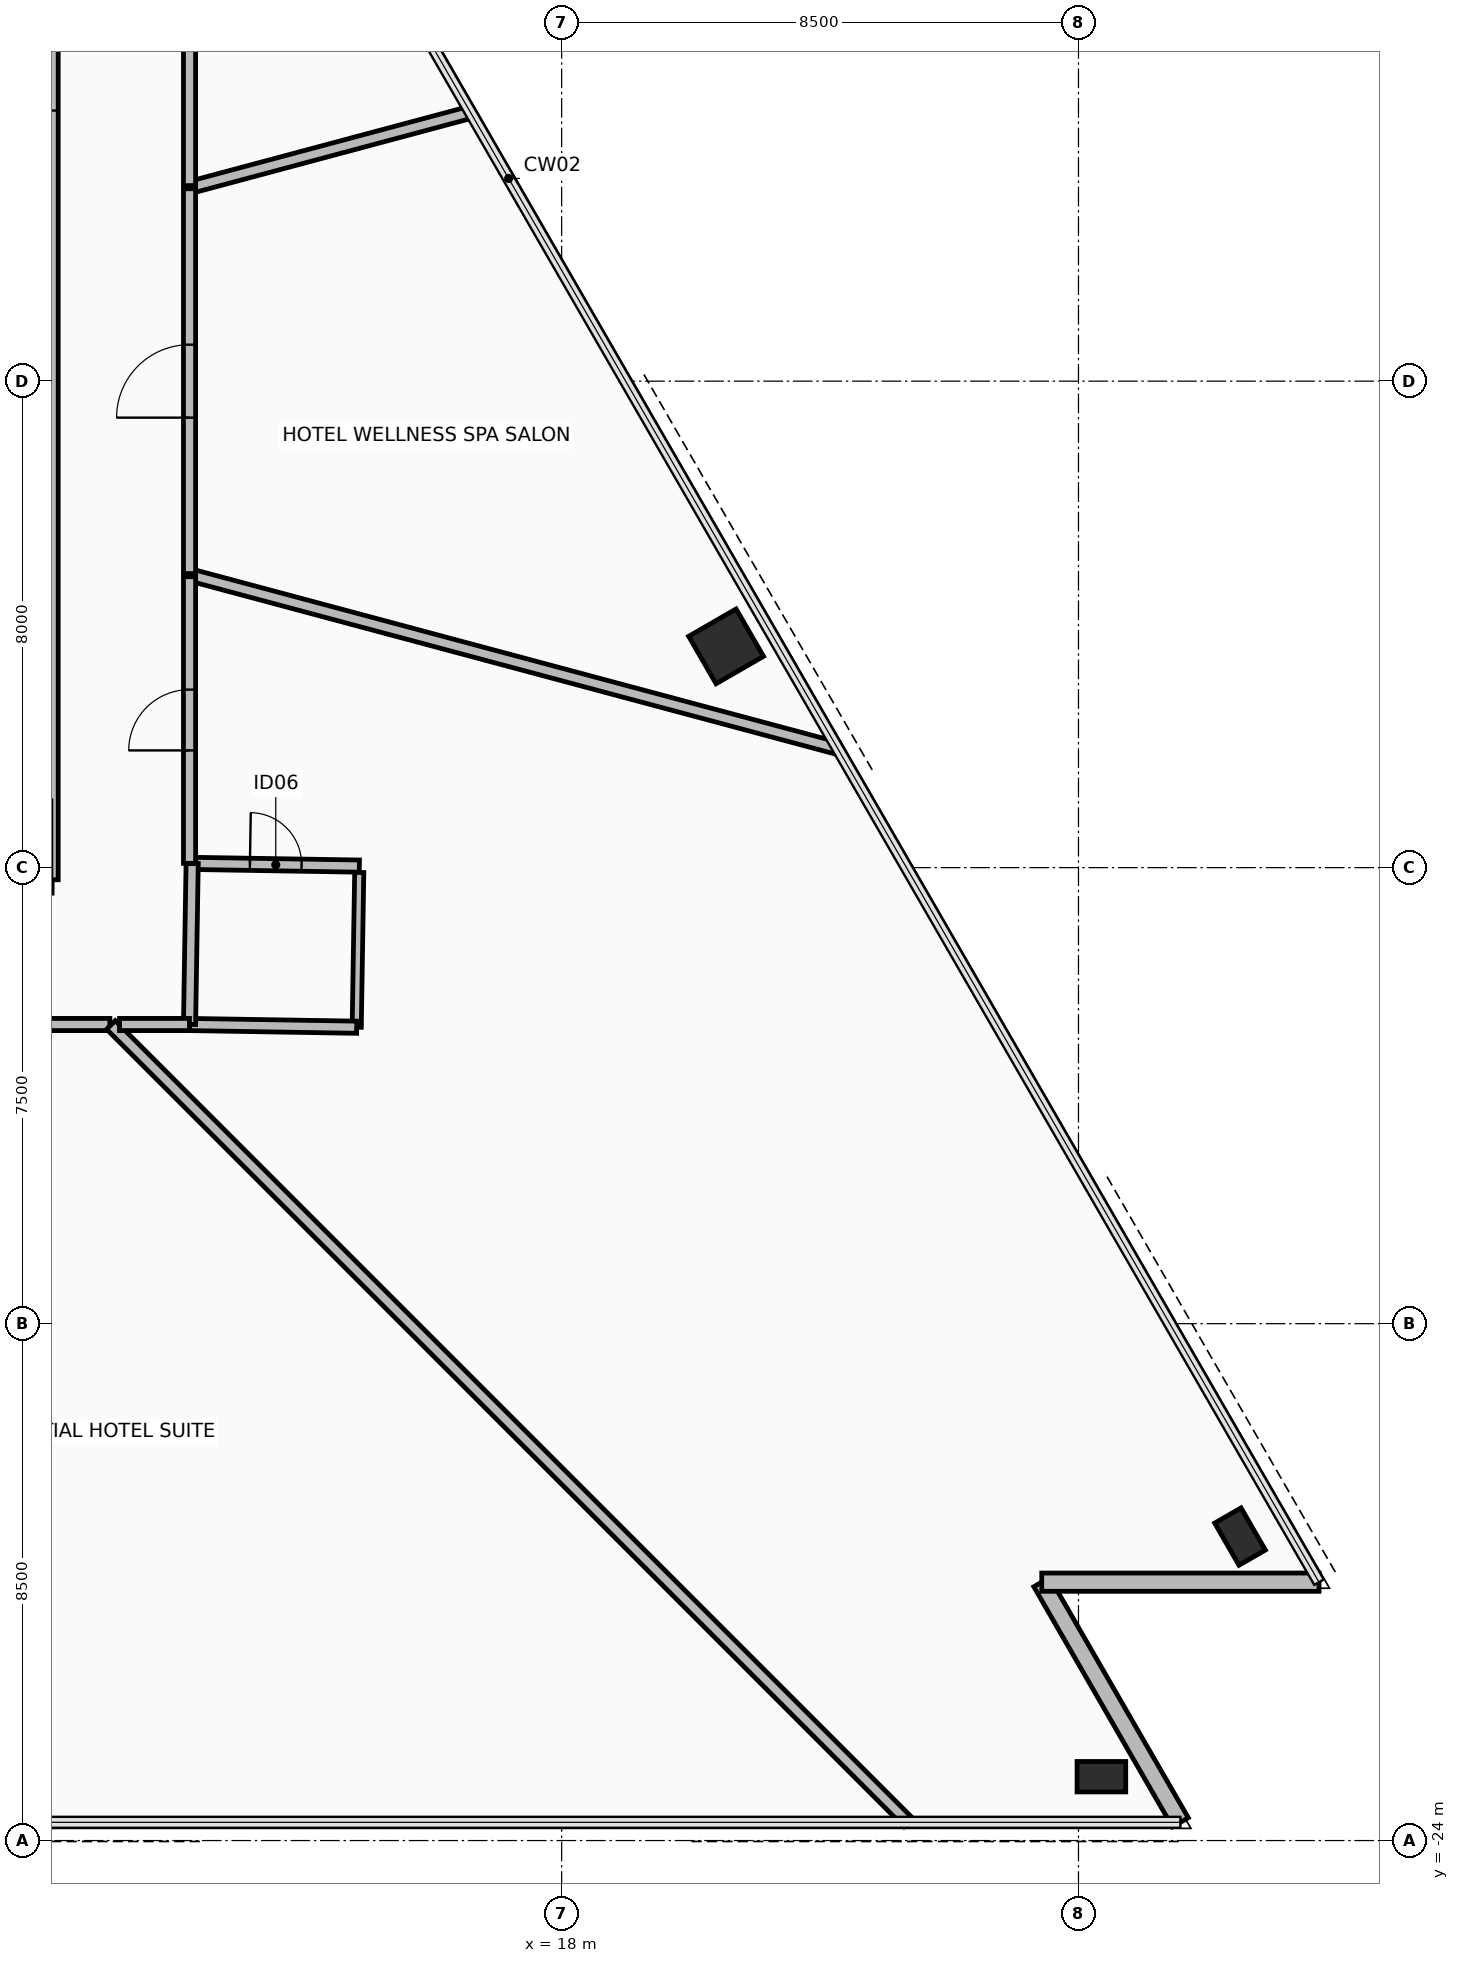
"""IFC4 building model, lengths in metres.
Left out: names, types, materials, properties, quantities, classifications, styles, units other than length and angle.
Written with IfcOpenShell. Run it as: python <this file> out.ifc"""

import sys

from ifc_helpers import new_model, si_unit, direction, frame, frame_2d, origin, origin_2d, place, context, subcontext, project, spatial, rectangle, hollow_rectangle, extrude, element, fill, save


model = new_model("IFC4")
c1 = context("Model", 3, precision=1e-05, world=origin(), true_north=direction((0.0, 1.0)))
c2 = subcontext(c1, "Body", "Model", "MODEL_VIEW")
j1 = project(units=[si_unit("LENGTHUNIT", "METRE"), si_unit("PLANEANGLEUNIT", "RADIAN")], contexts=[c1])
p1 = place(None, origin())
s1 = spatial("IfcSite", under=j1, at=p1, CompositionType="ELEMENT")
p2 = place(p1, origin())
s2 = spatial("IfcBuilding", under=s1, at=p2, CompositionType="ELEMENT")
p3 = place(p2, frame((0.0, 0.0, 48.85)))
s3 = spatial("IfcBuildingStorey", under=s2, at=p3, CompositionType="ELEMENT", Elevation=48.85)
for number, where, z_axis, x_axis in (
    (1, (26.877, -22.95, 0.0), (0.0, 0.0, 1.0), (1.0, 0.0, 0.0)),
    (2, (29.157, -19.001, 0.0), (0.0, 0.0, 1.0), (-0.5, 0.866, 0.0)),
):
    element("IfcColumn", number, at=place(p3, frame(where, z_axis=z_axis, x_axis=x_axis)), inside=s3, PredefinedType="COLUMN", context=c2, shape_type="SweptSolid", body=[
        extrude(hollow_rectangle(XDim=0.5, YDim=0.8, WallThickness=0.04, at=origin_2d()), origin(), (0.0, 0.0, 1.0), 3.4),
    ])
p4 = place(p3, frame((20.705, -4.361, 0.0), z_axis=(0.0, 0.0, 1.0), x_axis=(-0.500001511499, 0.866024531118, 0.0)))
e3 = element("IfcColumn", 3, at=p4, inside=s3, PredefinedType="COLUMN", context=c2, shape_type="SweptSolid", body=[
    extrude(hollow_rectangle(XDim=0.9, YDim=0.9, WallThickness=0.05, at=origin_2d()), origin(), (0.0, 0.0, 1.0), 3.4),
])
p5 = place(p3, frame((28.176, -23.7, 0.0), z_axis=(0.0, 0.0, 1.0), x_axis=(-0.500014431597, 0.866017071537, 0.0)))
e4 = element("IfcWall", 4, at=p5, inside=s3, PredefinedType="STANDARD", context=c2, shape_type="SweptSolid", body=[
    extrude(rectangle(XDim=4.56, YDim=0.3, at=frame_2d((2.28, 0.0))), origin(), (0.0, 0.0, 1.0), 2.42),
])
p6 = place(p3, frame((25.896, -19.751, 0.0), z_axis=(0.0, 0.0, 1.0), x_axis=(1.0, 0.0, 0.0)))
e5 = element("IfcWall", 5, at=p6, inside=s3, PredefinedType="STANDARD", context=c2, shape_type="SweptSolid", body=[
    extrude(rectangle(XDim=4.56, YDim=0.3, at=frame_2d((2.28, 0.0))), origin(), (0.0, 0.0, 1.0), 2.42),
])
p7 = place(p3, frame((-9.62, -8.32, 0.0), z_axis=(0.0, 0.0, 1.0), x_axis=(1.0, 0.0, 0.0)))
e6 = element("IfcWall", 6, at=p7, inside=s3, PredefinedType="PARTITIONING", context=c2, shape_type="SweptSolid", body=[
    extrude(rectangle(XDim=19.24, YDim=0.2, at=frame_2d((9.62, 0.0))), origin(), (0.0, 0.0, 1.0), 2.62),
])
p8 = place(p7, frame((15.02, 0.0, 0.0)))
e7 = element("IfcOpeningElement", 7, at=p8, cuts=e6, PredefinedType="OPENING", context=c2, shape_type="SweptSolid", body=[
    extrude(rectangle(XDim=0.9, YDim=2.1, at=frame_2d((0.45, 1.05))), frame((0.0, 0.11, 0.0), z_axis=(0.0, -1.0, 0.0), x_axis=(1.0, 0.0, 0.0)), (0.0, 0.0, 1.0), 0.22),
])
p9 = place(p3, frame((9.62, -8.2, 0.0), z_axis=(0.0, 0.0, 1.0), x_axis=(0.0, 1.0, 0.0)))
e8 = element("IfcWall", 8, at=p9, inside=s3, PredefinedType="PARTITIONING", context=c2, shape_type="SweptSolid", body=[
    extrude(rectangle(XDim=16.4, YDim=0.2, at=frame_2d((8.2, 0.0))), origin(), (0.0, 0.0, 1.0), 2.62),
])
p10 = place(p9, frame((12.65, 0.0, 0.0)))
e9 = element("IfcOpeningElement", 9, at=p10, cuts=e8, PredefinedType="OPENING", context=c2, shape_type="SweptSolid", body=[
    extrude(rectangle(XDim=1.1, YDim=2.15, at=frame_2d((0.55, 1.075))), frame((0.0, 0.11, 0.0), z_axis=(0.0, -1.0, 0.0), x_axis=(1.0, 0.0, 0.0)), (0.0, 0.0, 1.0), 0.22),
])
p11 = place(p3, frame((11.923, -7.93, 0.0), z_axis=(0.0, 0.0, 1.0), x_axis=(0.999868029143, -0.016245747077, 0.0)))
e10 = element("IfcWall", 10, at=p11, inside=s3, PredefinedType="PARTITIONING", context=c2, shape_type="SweptSolid", body=[
    extrude(rectangle(XDim=2.75, YDim=0.2, at=frame_2d((1.375, 0.0))), origin(), (0.0, 0.0, 1.0), 3.225),
])
p12 = place(p11, frame((0.95, 0.0, 0.0)))
e11 = element("IfcOpeningElement", 11, at=p12, cuts=e10, PredefinedType="OPENING", context=c2, shape_type="SweptSolid", body=[
    extrude(rectangle(XDim=0.85, YDim=2.1, at=frame_2d((0.425, 1.05))), frame((0.0, 0.11, 0.0), z_axis=(0.0, -1.0, 0.0), x_axis=(1.0, 0.0, 0.0)), (0.0, 0.0, 1.0), 0.22),
])
p13 = place(p3, frame((14.671, -8.08, 0.0), z_axis=(0.0, 0.0, 1.0), x_axis=(-0.016307914507, -0.99986701712, 0.0)))
e12 = element("IfcWall", 12, at=p13, inside=s3, PredefinedType="PARTITIONING", context=c2, shape_type="SweptSolid", body=[
    extrude(rectangle(XDim=2.545, YDim=0.15, at=frame_2d((1.272, 0.0))), origin(), (0.0, 0.0, 1.0), 2.62),
])
p14 = place(p3, frame((14.63, -10.625, 0.0), z_axis=(0.0, 0.0, 1.0), x_axis=(-0.999868029143, 0.016245747077, 0.0)))
e13 = element("IfcWall", 13, at=p14, inside=s3, PredefinedType="PARTITIONING", context=c2, shape_type="SweptSolid", body=[
    extrude(rectangle(XDim=2.75, YDim=0.2, at=frame_2d((1.375, 0.0))), origin(), (0.0, 0.0, 1.0), 2.62),
])
p15 = place(p3, frame((11.88, -10.578, 0.0), z_axis=(0.0, 0.0, 1.0), x_axis=(0.016318711927, 0.999866840955, 0.0)))
e14 = element("IfcWall", 14, at=p15, inside=s3, PredefinedType="PARTITIONING", context=c2, shape_type="SweptSolid", body=[
    extrude(rectangle(XDim=2.648, YDim=0.2, at=frame_2d((1.324, 0.0))), origin(), (0.0, 0.0, 1.0), 2.62),
])
p16 = place(p3, frame((16.5, 4.421, 0.0), z_axis=(0.0, 0.0, 1.0), x_axis=(-0.965923733473, -0.258826855473, 0.0)))
e15 = element("IfcWall", 15, at=p16, inside=s3, PredefinedType="PARTITIONING", context=c2, shape_type="SweptSolid", body=[
    extrude(rectangle(XDim=4.75, YDim=0.2, at=frame_2d((2.375, 0.0))), origin(), (0.0, 0.0, 1.0), 2.42),
])
p17 = place(p3, frame((11.88, 3.216, 0.0), z_axis=(0.0, 0.0, 1.0), x_axis=(0.0, 1.0, 0.0)))
e16 = element("IfcWall", 16, at=p17, inside=s3, PredefinedType="PARTITIONING", context=c2, shape_type="SweptSolid", body=[
    extrude(rectangle(XDim=7.259, YDim=0.2, at=frame_2d((3.63, 0.0))), origin(), (0.0, 0.0, 1.0), 2.42),
])
p18 = place(p17, frame((3.03, 0.0, 0.0)))
e17 = element("IfcOpeningElement", 17, at=p18, cuts=e16, PredefinedType="OPENING", context=c2, shape_type="SweptSolid", body=[
    extrude(rectangle(XDim=1.2, YDim=2.15, at=frame_2d((0.6, 1.075))), frame((0.0, 0.11, 0.0), z_axis=(0.0, -1.0, 0.0), x_axis=(1.0, 0.0, 0.0)), (0.0, 0.0, 1.0), 0.22),
])
p19 = place(p3, frame((2.867, -10.58, 0.0), z_axis=(0.0, 0.0, 1.0), x_axis=(1.0, 0.0, 0.0)))
e18 = element("IfcWall", 18, at=p19, inside=s3, PredefinedType="PARTITIONING", context=c2, shape_type="SweptSolid", body=[
    extrude(rectangle(XDim=7.702, YDim=0.2, at=frame_2d((3.851, 0.0))), origin(), (0.0, 0.0, 1.0), 2.62),
])
p20 = place(p19, frame((3.351, 0.0, 0.0)))
e19 = element("IfcOpeningElement", 19, at=p20, cuts=e18, PredefinedType="OPENING", context=c2, shape_type="SweptSolid", body=[
    extrude(rectangle(XDim=1.0, YDim=2.15, at=frame_2d((0.5, 1.075))), frame((0.0, 0.11, 0.0), z_axis=(0.0, -1.0, 0.0), x_axis=(1.0, 0.0, 0.0)), (0.0, 0.0, 1.0), 0.22),
])
p21 = place(p3, frame((10.587, -10.587, 0.0), z_axis=(0.0, 0.0, 1.0), x_axis=(0.707106781187, -0.707106781187, 0.0)))
e20 = element("IfcWall", 20, at=p21, inside=s3, PredefinedType="PARTITIONING", context=c2, shape_type="SweptSolid", body=[
    extrude(rectangle(XDim=18.544, YDim=0.2, at=frame_2d((9.272, 0.0))), origin(), (0.0, 0.0, 1.0), 2.42),
])
p22 = place(p3, frame((11.912, -3.192, 0.0), z_axis=(0.0, 0.0, 1.0), x_axis=(0.965922374415, -0.258831927328, 0.0)))
e21 = element("IfcWall", 21, at=p22, inside=s3, PredefinedType="PARTITIONING", context=c2, shape_type="SweptSolid", body=[
    extrude(rectangle(XDim=10.992, YDim=0.2, at=frame_2d((5.496, 0.0))), origin(), (0.0, 0.0, 1.0), 2.42),
])
p23 = place(p3, frame((10.729, -10.58, 0.0), z_axis=(0.0, 0.0, 1.0), x_axis=(1.0, 0.0, 0.0)))
e22 = element("IfcWall", 22, at=p23, inside=s3, PredefinedType="PARTITIONING", context=c2, shape_type="SweptSolid", body=[
    extrude(rectangle(XDim=1.151, YDim=0.2, at=frame_2d((0.575, 0.0))), origin(), (0.0, 0.0, 1.0), 3.225),
])
p24 = place(p3, frame((11.88, -7.93, 0.0), z_axis=(0.0, 0.0, 1.0), x_axis=(0.0, 1.0, 0.0)))
e23 = element("IfcWall", 23, at=p24, inside=s3, PredefinedType="PARTITIONING", context=c2, shape_type="SweptSolid", body=[
    extrude(rectangle(XDim=4.714, YDim=0.2, at=frame_2d((2.357, 0.0))), origin(), (0.0, 0.0, 1.0), 2.62),
])
p25 = place(p24, frame((1.857, 0.0, 0.0)))
e24 = element("IfcOpeningElement", 24, at=p25, cuts=e23, PredefinedType="OPENING", context=c2, shape_type="SweptSolid", body=[
    extrude(rectangle(XDim=1.0, YDim=2.15, at=frame_2d((0.5, 1.075))), frame((0.0, 0.11, 0.0), z_axis=(0.0, -1.0, 0.0), x_axis=(1.0, 0.0, 0.0)), (0.0, 0.0, 1.0), 0.22),
])
p26 = place(p3, frame((11.88, -3.164, 0.0), z_axis=(0.0, 0.0, 1.0), x_axis=(0.0, 1.0, 0.0)))
e25 = element("IfcWall", 25, at=p26, inside=s3, PredefinedType="PARTITIONING", context=c2, shape_type="SweptSolid", body=[
    extrude(rectangle(XDim=6.328, YDim=0.2, at=frame_2d((3.164, 0.0))), origin(), (0.0, 0.0, 1.0), 3.225),
])
p27 = place(p26, frame((2.564, 0.0, 0.0)))
e26 = element("IfcOpeningElement", 26, at=p27, cuts=e25, PredefinedType="OPENING", context=c2, shape_type="SweptSolid", body=[
    extrude(rectangle(XDim=1.2, YDim=2.15, at=frame_2d((0.6, 1.075))), frame((0.0, 0.11, 0.0), z_axis=(0.0, -1.0, 0.0), x_axis=(1.0, 0.0, 0.0)), (0.0, 0.0, 1.0), 0.22),
])
p28 = place(p10, frame((1.1, 0.0, 0.0), z_axis=(0.0, 0.0, 1.0), x_axis=(-1.0, 0.0, 0.0)))
e27 = element("IfcDoor", 27, at=p28, inside=s3, OperationType="SINGLE_SWING_LEFT", PredefinedType="DOOR", context=c2, shape_type="SweptSolid", body=[
    extrude(rectangle(XDim=1.1, YDim=2.15, at=frame_2d((0.55, 1.075))), frame((0.0, 0.025, 0.0), z_axis=(0.0, -1.0, 0.0), x_axis=(1.0, 0.0, 0.0)), (0.0, 0.0, 1.0), 0.05),
])
fill(e9, e27)
p29 = place(p12, origin())
e28 = element("IfcDoor", 28, at=p29, inside=s3, OperationType="SINGLE_SWING_RIGHT", PredefinedType="DOOR", context=c2, shape_type="SweptSolid", body=[
    extrude(rectangle(XDim=0.85, YDim=2.1, at=frame_2d((0.425, 1.05))), frame((0.0, 0.025, 0.0), z_axis=(0.0, -1.0, 0.0), x_axis=(1.0, 0.0, 0.0)), (0.0, 0.0, 1.0), 0.05),
])
fill(e11, e28)
p30 = place(p25, origin())
e29 = element("IfcDoor", 29, at=p30, inside=s3, OperationType="SINGLE_SWING_LEFT", PredefinedType="DOOR", context=c2, shape_type="SweptSolid", body=[
    extrude(rectangle(XDim=1.0, YDim=2.15, at=frame_2d((0.5, 1.075))), frame((0.0, 0.025, 0.0), z_axis=(0.0, -1.0, 0.0), x_axis=(1.0, 0.0, 0.0)), (0.0, 0.0, 1.0), 0.05),
])
fill(e24, e29)
p31 = place(p27, origin())
e30 = element("IfcDoor", 30, at=p31, inside=s3, OperationType="SINGLE_SWING_LEFT", PredefinedType="DOOR", context=c2, shape_type="SweptSolid", body=[
    extrude(rectangle(XDim=1.2, YDim=2.15, at=frame_2d((0.6, 1.075))), frame((0.0, 0.025, 0.0), z_axis=(0.0, -1.0, 0.0), x_axis=(1.0, 0.0, 0.0)), (0.0, 0.0, 1.0), 0.05),
])
fill(e26, e30)
save(model, sys.argv[1])
